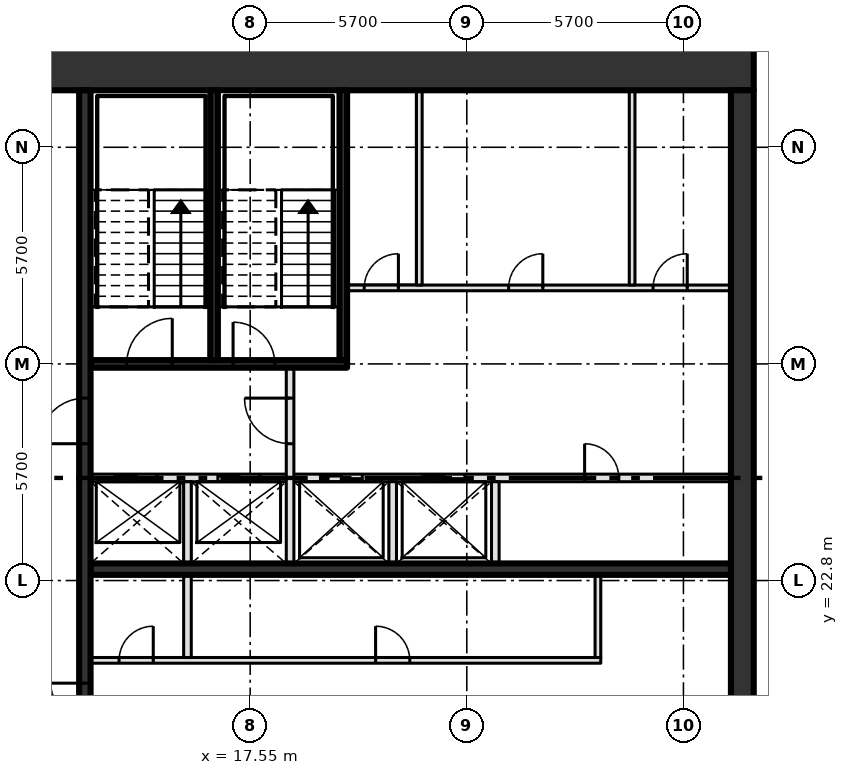
"""IFC4 building model, lengths in metres.
Left out: names, types, materials, properties, quantities, classifications, styles, units other than length and angle.
Written with IfcOpenShell. Run it as: python <this file> out.ifc"""

import sys

from ifc_helpers import new_model, si_unit, direction, frame, frame_2d, origin, place, context, subcontext, project, spatial, rectangle, extrude, element, fill, save


model = new_model("IFC4")
c1 = context("Model", 3, precision=1e-05, world=origin(), true_north=direction((0.0, 1.0)))
c2 = subcontext(c1, "Body", "Model", "MODEL_VIEW")
j1 = project(units=[si_unit("LENGTHUNIT", "METRE"), si_unit("PLANEANGLEUNIT", "RADIAN")], contexts=[c1])
p1 = place(None, origin())
s1 = spatial("IfcSite", under=j1, at=p1, CompositionType="ELEMENT")
p2 = place(p1, origin())
s2 = spatial("IfcBuilding", under=s1, at=p2, CompositionType="ELEMENT")
p3 = place(p2, frame((0.0, 0.0, 302.4)))
s3 = spatial("IfcBuildingStorey", under=s2, at=p3, CompositionType="ELEMENT", Elevation=302.4)
p4 = place(p3, frame((8.0, 36.3, -0.3), z_axis=(0.0, 0.0, 1.0), x_axis=(1.0, 0.0, 0.0)))
e1 = element("IfcWall", 1, at=p4, inside=s3, PredefinedType="SHEAR", context=c2, shape_type="SweptSolid", body=[
    extrude(rectangle(XDim=22.8, YDim=1.2, at=frame_2d((11.4, 0.0))), origin(), (0.0, 0.0, 1.0), 4.2),
])
p5 = place(p4, frame((2.3, 0.0, 0.3)))
e2 = element("IfcOpeningElement", 2, at=p5, cuts=e1, PredefinedType="OPENING", context=c2, shape_type="SweptSolid", body=[
    extrude(rectangle(XDim=1.8, YDim=2.1, at=frame_2d((0.9, 1.05))), frame((0.0, 0.61, 0.0), z_axis=(0.0, -1.0, 0.0), x_axis=(1.0, 0.0, 0.0)), (0.0, 0.0, 1.0), 1.22),
])
p6 = place(p3, frame((30.5, 14.7, -0.3), z_axis=(0.0, 0.0, 1.0), x_axis=(0.0, 1.0, 0.0)))
e3 = element("IfcWall", 3, at=p6, inside=s3, PredefinedType="SHEAR", context=c2, shape_type="SweptSolid", body=[
    extrude(rectangle(XDim=21.0, YDim=0.6, at=frame_2d((10.5, 0.0))), origin(), (0.0, 0.0, 1.0), 4.2),
])
p7 = place(p3, frame((13.35, 20.7, 0.0), z_axis=(0.0, 0.0, 1.0), x_axis=(1.0, 0.0, 0.0)))
e4 = element("IfcWall", 4, at=p7, inside=s3, PredefinedType="PARTITIONING", context=c2, shape_type="SweptSolid", body=[
    extrude(rectangle(XDim=13.425, YDim=0.15, at=frame_2d((6.712, 0.0))), origin(), (0.0, 0.0, 1.0), 3.9),
])
p8 = place(p7, frame((0.75, 0.0, 0.0)))
e5 = element("IfcOpeningElement", 5, at=p8, cuts=e4, PredefinedType="OPENING", context=c2, shape_type="SweptSolid", body=[
    extrude(rectangle(XDim=0.9, YDim=2.1, at=frame_2d((0.45, 1.05))), frame((0.0, 0.085, 0.0), z_axis=(0.0, -1.0, 0.0), x_axis=(1.0, 0.0, 0.0)), (0.0, 0.0, 1.0), 0.17),
])
p9 = place(p7, frame((7.5, 0.0, 0.0)))
e6 = element("IfcOpeningElement", 6, at=p9, cuts=e4, PredefinedType="OPENING", context=c2, shape_type="SweptSolid", body=[
    extrude(rectangle(XDim=0.9, YDim=2.1, at=frame_2d((0.45, 1.05))), frame((0.0, 0.085, 0.0), z_axis=(0.0, -1.0, 0.0), x_axis=(1.0, 0.0, 0.0)), (0.0, 0.0, 1.0), 0.17),
])
p10 = place(p3, frame((13.35, 23.1, 0.0), z_axis=(0.0, 0.0, 1.0), x_axis=(1.0, 0.0, 0.0)))
e7 = element("IfcWall", 7, at=p10, inside=s3, PredefinedType="SHEAR", context=c2, shape_type="SweptSolid", body=[
    extrude(rectangle(XDim=16.85, YDim=0.3, at=frame_2d((8.425, 0.0))), origin(), (0.0, 0.0, 1.0), 3.9),
])
p11 = place(p3, frame((13.35, 25.5, 0.0), z_axis=(0.0, 0.0, 1.0), x_axis=(1.0, 0.0, 0.0)))
e8 = element("IfcWall", 8, at=p11, inside=s3, PredefinedType="SOLIDWALL", context=c2, shape_type="SweptSolid", body=[
    extrude(rectangle(XDim=16.85, YDim=0.2, at=frame_2d((8.425, 0.0))), origin(), (0.0, 0.0, 1.0), 3.9),
])
p12 = place(p11, frame((0.65, 0.0, 0.0)))
e9 = element("IfcOpeningElement", 9, at=p12, cuts=e8, PredefinedType="OPENING", context=c2, shape_type="SweptSolid", body=[
    extrude(rectangle(XDim=1.1, YDim=2.1, at=frame_2d((0.55, 1.05))), frame((0.0, 0.11, 0.0), z_axis=(0.0, -1.0, 0.0), x_axis=(1.0, 0.0, 0.0)), (0.0, 0.0, 1.0), 0.22),
])
p13 = place(p11, frame((3.35, 0.0, 0.0)))
e10 = element("IfcOpeningElement", 10, at=p13, cuts=e8, PredefinedType="OPENING", context=c2, shape_type="SweptSolid", body=[
    extrude(rectangle(XDim=1.1, YDim=2.1, at=frame_2d((0.55, 1.05))), frame((0.0, 0.11, 0.0), z_axis=(0.0, -1.0, 0.0), x_axis=(1.0, 0.0, 0.0)), (0.0, 0.0, 1.0), 0.22),
])
p14 = place(p11, frame((6.05, 0.0, 0.0)))
e11 = element("IfcOpeningElement", 11, at=p14, cuts=e8, PredefinedType="OPENING", context=c2, shape_type="SweptSolid", body=[
    extrude(rectangle(XDim=1.1, YDim=2.1, at=frame_2d((0.55, 1.05))), frame((0.0, 0.11, 0.0), z_axis=(0.0, -1.0, 0.0), x_axis=(1.0, 0.0, 0.0)), (0.0, 0.0, 1.0), 0.22),
])
p15 = place(p11, frame((8.75, 0.0, 0.0)))
e12 = element("IfcOpeningElement", 12, at=p15, cuts=e8, PredefinedType="OPENING", context=c2, shape_type="SweptSolid", body=[
    extrude(rectangle(XDim=1.1, YDim=2.1, at=frame_2d((0.55, 1.05))), frame((0.0, 0.11, 0.0), z_axis=(0.0, -1.0, 0.0), x_axis=(1.0, 0.0, 0.0)), (0.0, 0.0, 1.0), 0.22),
])
p16 = place(p11, frame((13.0, 0.0, 0.0)))
e13 = element("IfcOpeningElement", 13, at=p16, cuts=e8, PredefinedType="OPENING", context=c2, shape_type="SweptSolid", body=[
    extrude(rectangle(XDim=0.9, YDim=2.1, at=frame_2d((0.45, 1.05))), frame((0.0, 0.11, 0.0), z_axis=(0.0, -1.0, 0.0), x_axis=(1.0, 0.0, 0.0)), (0.0, 0.0, 1.0), 0.22),
])
p17 = place(p3, frame((13.35, 28.5, 0.0), z_axis=(0.0, 0.0, 1.0), x_axis=(1.0, 0.0, 0.0)))
e14 = element("IfcWall", 14, at=p17, inside=s3, PredefinedType="SOLIDWALL", context=c2, shape_type="SweptSolid", body=[
    extrude(rectangle(XDim=6.75, YDim=0.2, at=frame_2d((3.375, 0.0))), origin(), (0.0, 0.0, 1.0), 3.9),
])
p18 = place(p17, frame((0.95, 0.0, 0.0)))
e15 = element("IfcOpeningElement", 15, at=p18, cuts=e14, PredefinedType="OPENING", context=c2, shape_type="SweptSolid", body=[
    extrude(rectangle(XDim=1.2, YDim=2.1, at=frame_2d((0.6, 1.05))), frame((0.0, 0.11, 0.0), z_axis=(0.0, -1.0, 0.0), x_axis=(1.0, 0.0, 0.0)), (0.0, 0.0, 1.0), 0.22),
])
p19 = place(p17, frame((3.75, 0.0, 0.0)))
e16 = element("IfcOpeningElement", 16, at=p19, cuts=e14, PredefinedType="OPENING", context=c2, shape_type="SweptSolid", body=[
    extrude(rectangle(XDim=1.1, YDim=2.1, at=frame_2d((0.55, 1.05))), frame((0.0, 0.11, 0.0), z_axis=(0.0, -1.0, 0.0), x_axis=(1.0, 0.0, 0.0)), (0.0, 0.0, 1.0), 0.22),
])
p20 = place(p3, frame((20.1, 30.5, 0.0), z_axis=(0.0, 0.0, 1.0), x_axis=(1.0, 0.0, 0.0)))
e17 = element("IfcWall", 17, at=p20, inside=s3, PredefinedType="PARTITIONING", context=c2, shape_type="SweptSolid", body=[
    extrude(rectangle(XDim=10.1, YDim=0.15, at=frame_2d((5.05, 0.0))), origin(), (0.0, 0.0, 1.0), 3.9),
])
p21 = place(p20, frame((0.45, 0.0, 0.0)))
e18 = element("IfcOpeningElement", 18, at=p21, cuts=e17, PredefinedType="OPENING", context=c2, shape_type="SweptSolid", body=[
    extrude(rectangle(XDim=0.9, YDim=2.1, at=frame_2d((0.45, 1.05))), frame((0.0, 0.085, 0.0), z_axis=(0.0, -1.0, 0.0), x_axis=(1.0, 0.0, 0.0)), (0.0, 0.0, 1.0), 0.17),
])
p22 = place(p20, frame((4.25, 0.0, 0.0)))
e19 = element("IfcOpeningElement", 19, at=p22, cuts=e17, PredefinedType="OPENING", context=c2, shape_type="SweptSolid", body=[
    extrude(rectangle(XDim=0.9, YDim=2.1, at=frame_2d((0.45, 1.05))), frame((0.0, 0.085, 0.0), z_axis=(0.0, -1.0, 0.0), x_axis=(1.0, 0.0, 0.0)), (0.0, 0.0, 1.0), 0.17),
])
p23 = place(p20, frame((8.05, 0.0, 0.0)))
e20 = element("IfcOpeningElement", 20, at=p23, cuts=e17, PredefinedType="OPENING", context=c2, shape_type="SweptSolid", body=[
    extrude(rectangle(XDim=0.9, YDim=2.1, at=frame_2d((0.45, 1.05))), frame((0.0, 0.085, 0.0), z_axis=(0.0, -1.0, 0.0), x_axis=(1.0, 0.0, 0.0)), (0.0, 0.0, 1.0), 0.17),
])
p24 = place(p3, frame((13.2, 14.7, 0.0), z_axis=(0.0, 0.0, 1.0), x_axis=(0.0, 1.0, 0.0)))
e21 = element("IfcWall", 21, at=p24, inside=s3, PredefinedType="SHEAR", context=c2, shape_type="SweptSolid", body=[
    extrude(rectangle(XDim=21.0, YDim=0.3, at=frame_2d((10.5, 0.0))), origin(), (0.0, 0.0, 1.0), 3.9),
])
p25 = place(p24, frame((3.6, 0.0, 0.0)))
e22 = element("IfcOpeningElement", 22, at=p25, cuts=e21, PredefinedType="OPENING", context=c2, shape_type="SweptSolid", body=[
    extrude(rectangle(XDim=1.8, YDim=2.1, at=frame_2d((0.9, 1.05))), frame((0.0, 0.16, 0.0), z_axis=(0.0, -1.0, 0.0), x_axis=(1.0, 0.0, 0.0)), (0.0, 0.0, 1.0), 0.32),
])
p26 = place(p24, frame((11.7, 0.0, 0.0)))
e23 = element("IfcOpeningElement", 23, at=p26, cuts=e21, PredefinedType="OPENING", context=c2, shape_type="SweptSolid", body=[
    extrude(rectangle(XDim=1.2, YDim=2.1, at=frame_2d((0.6, 1.05))), frame((0.0, 0.16, 0.0), z_axis=(0.0, -1.0, 0.0), x_axis=(1.0, 0.0, 0.0)), (0.0, 0.0, 1.0), 0.32),
])
p27 = place(p3, frame((15.9, 20.775, 0.0), z_axis=(0.0, 0.0, 1.0), x_axis=(0.0, 1.0, 0.0)))
e24 = element("IfcWall", 24, at=p27, inside=s3, PredefinedType="SOLIDWALL", context=c2, shape_type="SweptSolid", body=[
    extrude(rectangle(XDim=4.625, YDim=0.2, at=frame_2d((2.312, 0.0))), origin(), (0.0, 0.0, 1.0), 3.9),
])
p28 = place(p3, frame((16.6, 28.6, 0.0), z_axis=(0.0, 0.0, 1.0), x_axis=(0.0, 1.0, 0.0)))
e25 = element("IfcWall", 25, at=p28, inside=s3, PredefinedType="SOLIDWALL", context=c2, shape_type="SweptSolid", body=[
    extrude(rectangle(XDim=7.1, YDim=0.2, at=frame_2d((3.55, 0.0))), origin(), (0.0, 0.0, 1.0), 3.9),
])
p29 = place(p3, frame((18.6, 23.25, 0.0), z_axis=(0.0, 0.0, 1.0), x_axis=(0.0, 1.0, 0.0)))
e26 = element("IfcWall", 26, at=p29, inside=s3, PredefinedType="SOLIDWALL", context=c2, shape_type="SweptSolid", body=[
    extrude(rectangle(XDim=5.15, YDim=0.2, at=frame_2d((2.575, 0.0))), origin(), (0.0, 0.0, 1.0), 3.9),
])
p30 = place(p29, frame((3.15, 0.0, 0.0)))
e27 = element("IfcOpeningElement", 27, at=p30, cuts=e26, PredefinedType="OPENING", context=c2, shape_type="SweptSolid", body=[
    extrude(rectangle(XDim=1.2, YDim=2.1, at=frame_2d((0.6, 1.05))), frame((0.0, 0.11, 0.0), z_axis=(0.0, -1.0, 0.0), x_axis=(1.0, 0.0, 0.0)), (0.0, 0.0, 1.0), 0.22),
])
p31 = place(p3, frame((20.0, 28.6, 0.0), z_axis=(0.0, 0.0, 1.0), x_axis=(0.0, 1.0, 0.0)))
e28 = element("IfcWall", 28, at=p31, inside=s3, PredefinedType="SOLIDWALL", context=c2, shape_type="SweptSolid", body=[
    extrude(rectangle(XDim=7.1, YDim=0.2, at=frame_2d((3.55, 0.0))), origin(), (0.0, 0.0, 1.0), 3.9),
])
p32 = place(p3, frame((21.3, 23.25, 0.0), z_axis=(0.0, 0.0, 1.0), x_axis=(0.0, 1.0, 0.0)))
e29 = element("IfcWall", 29, at=p32, inside=s3, PredefinedType="SOLIDWALL", context=c2, shape_type="SweptSolid", body=[
    extrude(rectangle(XDim=2.15, YDim=0.2, at=frame_2d((1.075, 0.0))), origin(), (0.0, 0.0, 1.0), 3.9),
])
p33 = place(p3, frame((22.0, 30.575, 0.0), z_axis=(0.0, 0.0, 1.0), x_axis=(0.0, 1.0, 0.0)))
e30 = element("IfcWall", 30, at=p33, inside=s3, PredefinedType="PARTITIONING", context=c2, shape_type="SweptSolid", body=[
    extrude(rectangle(XDim=5.125, YDim=0.15, at=frame_2d((2.562, 0.0))), origin(), (0.0, 0.0, 1.0), 3.9),
])
p34 = place(p3, frame((24.0, 23.25, 0.0), z_axis=(0.0, 0.0, 1.0), x_axis=(0.0, 1.0, 0.0)))
e31 = element("IfcWall", 31, at=p34, inside=s3, PredefinedType="SOLIDWALL", context=c2, shape_type="SweptSolid", body=[
    extrude(rectangle(XDim=2.15, YDim=0.2, at=frame_2d((1.075, 0.0))), origin(), (0.0, 0.0, 1.0), 3.9),
])
p35 = place(p3, frame((26.7, 20.775, 0.0), z_axis=(0.0, 0.0, 1.0), x_axis=(0.0, 1.0, 0.0)))
e32 = element("IfcWall", 32, at=p35, inside=s3, PredefinedType="PARTITIONING", context=c2, shape_type="SweptSolid", body=[
    extrude(rectangle(XDim=2.175, YDim=0.15, at=frame_2d((1.087, 0.0))), origin(), (0.0, 0.0, 1.0), 3.9),
])
p36 = place(p3, frame((27.6, 30.575, 0.0), z_axis=(0.0, 0.0, 1.0), x_axis=(0.0, 1.0, 0.0)))
e33 = element("IfcWall", 33, at=p36, inside=s3, PredefinedType="PARTITIONING", context=c2, shape_type="SweptSolid", body=[
    extrude(rectangle(XDim=5.125, YDim=0.15, at=frame_2d((2.562, 0.0))), origin(), (0.0, 0.0, 1.0), 3.9),
])
p37 = place(p12, origin())
e34 = element("IfcDoor", 34, at=p37, inside=s3, OperationType="SLIDING_TO_LEFT", PredefinedType="DOOR", context=c2, shape_type="SweptSolid", body=[
    extrude(rectangle(XDim=1.1, YDim=2.1, at=frame_2d((0.55, 1.05))), frame((0.0, 0.025, 0.0), z_axis=(0.0, -1.0, 0.0), x_axis=(1.0, 0.0, 0.0)), (0.0, 0.0, 1.0), 0.05),
])
fill(e9, e34)
p38 = place(p13, origin())
e35 = element("IfcDoor", 35, at=p38, inside=s3, OperationType="SLIDING_TO_LEFT", PredefinedType="DOOR", context=c2, shape_type="SweptSolid", body=[
    extrude(rectangle(XDim=1.1, YDim=2.1, at=frame_2d((0.55, 1.05))), frame((0.0, 0.025, 0.0), z_axis=(0.0, -1.0, 0.0), x_axis=(1.0, 0.0, 0.0)), (0.0, 0.0, 1.0), 0.05),
])
fill(e10, e35)
p39 = place(p14, origin())
e36 = element("IfcDoor", 36, at=p39, inside=s3, OperationType="SLIDING_TO_LEFT", PredefinedType="DOOR", context=c2, shape_type="SweptSolid", body=[
    extrude(rectangle(XDim=1.1, YDim=2.1, at=frame_2d((0.55, 1.05))), frame((0.0, 0.025, 0.0), z_axis=(0.0, -1.0, 0.0), x_axis=(1.0, 0.0, 0.0)), (0.0, 0.0, 1.0), 0.05),
])
fill(e11, e36)
p40 = place(p15, origin())
e37 = element("IfcDoor", 37, at=p40, inside=s3, OperationType="SLIDING_TO_LEFT", PredefinedType="DOOR", context=c2, shape_type="SweptSolid", body=[
    extrude(rectangle(XDim=1.1, YDim=2.1, at=frame_2d((0.55, 1.05))), frame((0.0, 0.025, 0.0), z_axis=(0.0, -1.0, 0.0), x_axis=(1.0, 0.0, 0.0)), (0.0, 0.0, 1.0), 0.05),
])
fill(e12, e37)
p41 = place(p8, origin())
e38 = element("IfcDoor", 38, at=p41, inside=s3, OperationType="SINGLE_SWING_RIGHT", PredefinedType="DOOR", context=c2, shape_type="SweptSolid", body=[
    extrude(rectangle(XDim=0.9, YDim=2.1, at=frame_2d((0.45, 1.05))), frame((0.0, 0.025, 0.0), z_axis=(0.0, -1.0, 0.0), x_axis=(1.0, 0.0, 0.0)), (0.0, 0.0, 1.0), 0.05),
])
fill(e5, e38)
p42 = place(p9, origin())
e39 = element("IfcDoor", 39, at=p42, inside=s3, OperationType="SINGLE_SWING_LEFT", PredefinedType="DOOR", context=c2, shape_type="SweptSolid", body=[
    extrude(rectangle(XDim=0.9, YDim=2.1, at=frame_2d((0.45, 1.05))), frame((0.0, 0.025, 0.0), z_axis=(0.0, -1.0, 0.0), x_axis=(1.0, 0.0, 0.0)), (0.0, 0.0, 1.0), 0.05),
])
fill(e6, e39)
p43 = place(p16, origin())
e40 = element("IfcDoor", 40, at=p43, inside=s3, OperationType="SINGLE_SWING_LEFT", PredefinedType="DOOR", context=c2, shape_type="SweptSolid", body=[
    extrude(rectangle(XDim=0.9, YDim=2.1, at=frame_2d((0.45, 1.05))), frame((0.0, 0.025, 0.0), z_axis=(0.0, -1.0, 0.0), x_axis=(1.0, 0.0, 0.0)), (0.0, 0.0, 1.0), 0.05),
])
fill(e13, e40)
p44 = place(p21, origin())
e41 = element("IfcDoor", 41, at=p44, inside=s3, OperationType="SINGLE_SWING_RIGHT", PredefinedType="DOOR", context=c2, shape_type="SweptSolid", body=[
    extrude(rectangle(XDim=0.9, YDim=2.1, at=frame_2d((0.45, 1.05))), frame((0.0, 0.025, 0.0), z_axis=(0.0, -1.0, 0.0), x_axis=(1.0, 0.0, 0.0)), (0.0, 0.0, 1.0), 0.05),
])
fill(e18, e41)
p45 = place(p22, origin())
e42 = element("IfcDoor", 42, at=p45, inside=s3, OperationType="SINGLE_SWING_RIGHT", PredefinedType="DOOR", context=c2, shape_type="SweptSolid", body=[
    extrude(rectangle(XDim=0.9, YDim=2.1, at=frame_2d((0.45, 1.05))), frame((0.0, 0.025, 0.0), z_axis=(0.0, -1.0, 0.0), x_axis=(1.0, 0.0, 0.0)), (0.0, 0.0, 1.0), 0.05),
])
fill(e19, e42)
p46 = place(p23, origin())
e43 = element("IfcDoor", 43, at=p46, inside=s3, OperationType="SINGLE_SWING_RIGHT", PredefinedType="DOOR", context=c2, shape_type="SweptSolid", body=[
    extrude(rectangle(XDim=0.9, YDim=2.1, at=frame_2d((0.45, 1.05))), frame((0.0, 0.025, 0.0), z_axis=(0.0, -1.0, 0.0), x_axis=(1.0, 0.0, 0.0)), (0.0, 0.0, 1.0), 0.05),
])
fill(e20, e43)
p47 = place(p18, origin())
e44 = element("IfcDoor", 44, at=p47, inside=s3, OperationType="SINGLE_SWING_RIGHT", PredefinedType="DOOR", context=c2, shape_type="SweptSolid", body=[
    extrude(rectangle(XDim=1.2, YDim=2.1, at=frame_2d((0.6, 1.05))), frame((0.0, 0.025, 0.0), z_axis=(0.0, -1.0, 0.0), x_axis=(1.0, 0.0, 0.0)), (0.0, 0.0, 1.0), 0.05),
])
fill(e15, e44)
p48 = place(p19, origin())
e45 = element("IfcDoor", 45, at=p48, inside=s3, OperationType="SINGLE_SWING_LEFT", PredefinedType="DOOR", context=c2, shape_type="SweptSolid", body=[
    extrude(rectangle(XDim=1.1, YDim=2.1, at=frame_2d((0.55, 1.05))), frame((0.0, 0.025, 0.0), z_axis=(0.0, -1.0, 0.0), x_axis=(1.0, 0.0, 0.0)), (0.0, 0.0, 1.0), 0.05),
])
fill(e16, e45)
p49 = place(p25, origin())
e46 = element("IfcDoor", 46, at=p49, inside=s3, OperationType="DOUBLE_DOOR_SINGLE_SWING", PredefinedType="DOOR", context=c2, shape_type="SweptSolid", body=[
    extrude(rectangle(XDim=1.8, YDim=2.1, at=frame_2d((0.9, 1.05))), frame((0.0, 0.025, 0.0), z_axis=(0.0, -1.0, 0.0), x_axis=(1.0, 0.0, 0.0)), (0.0, 0.0, 1.0), 0.05),
])
fill(e22, e46)
p50 = place(p26, origin())
e47 = element("IfcDoor", 47, at=p50, inside=s3, OperationType="SINGLE_SWING_LEFT", PredefinedType="DOOR", context=c2, shape_type="SweptSolid", body=[
    extrude(rectangle(XDim=1.2, YDim=2.1, at=frame_2d((0.6, 1.05))), frame((0.0, 0.025, 0.0), z_axis=(0.0, -1.0, 0.0), x_axis=(1.0, 0.0, 0.0)), (0.0, 0.0, 1.0), 0.05),
])
fill(e23, e47)
p51 = place(p30, origin())
e48 = element("IfcDoor", 48, at=p51, inside=s3, OperationType="SINGLE_SWING_RIGHT", PredefinedType="DOOR", context=c2, shape_type="SweptSolid", body=[
    extrude(rectangle(XDim=1.2, YDim=2.1, at=frame_2d((0.6, 1.05))), frame((0.0, 0.025, 0.0), z_axis=(0.0, -1.0, 0.0), x_axis=(1.0, 0.0, 0.0)), (0.0, 0.0, 1.0), 0.05),
])
fill(e27, e48)
save(model, sys.argv[1])
